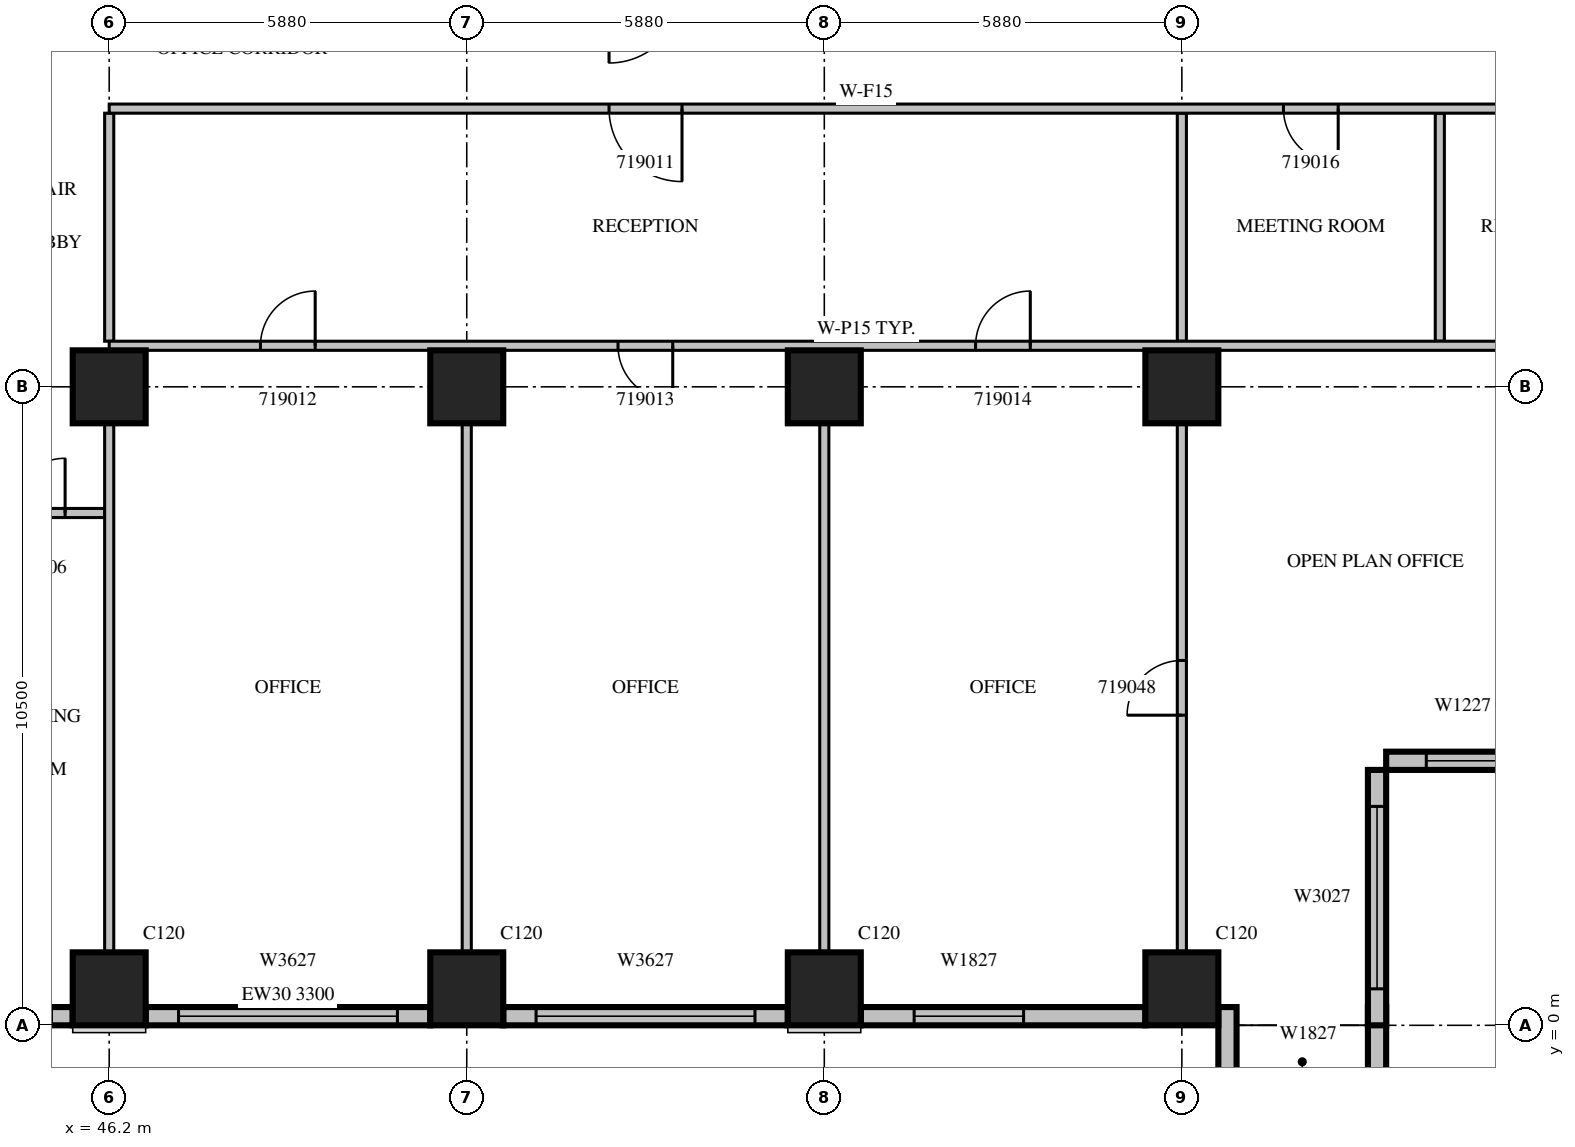
"""IFC4 building model, lengths in metres.
Left out: names, types, materials, properties, quantities, classifications, styles, units other than length and angle.
Written with IfcOpenShell. Run it as: python <this file> out.ifc"""

import sys

from ifc_helpers import new_model, si_unit, direction, frame, frame_2d, origin, origin_2d, place, context, subcontext, project, spatial, rectangle, extrude, source, transform, mapped, element, fill, save


model = new_model("IFC4")
c1 = context("Model", 3, precision=1e-05, world=origin(), true_north=direction((0.0, 1.0)))
c2 = subcontext(c1, "Body", "Model", "MODEL_VIEW")
j1 = project(units=[si_unit("LENGTHUNIT", "METRE"), si_unit("PLANEANGLEUNIT", "RADIAN")], contexts=[c1])
p1 = place(None, origin())
s1 = spatial("IfcSite", under=j1, at=p1, CompositionType="ELEMENT")
p2 = place(p1, origin())
s2 = spatial("IfcBuilding", under=s1, at=p2, CompositionType="ELEMENT")
p3 = place(p2, frame((0.0, 0.0, 90.9)))
s3 = spatial("IfcBuildingStorey", under=s2, at=p3, CompositionType="ELEMENT", Elevation=90.9)
m1 = source(origin(), c2, "Body", "SweptSolid", [
    extrude(rectangle(XDim=1.2, YDim=1.2, at=origin_2d()), origin(), (0.0, 0.0, 1.0), 4.2),
])
for number, where, z_axis, x_axis in (
    (1, (46.2, 0.6, 0.0), (0.0, 0.0, 1.0), (1.0, 0.0, 0.0)),
    (2, (52.08, 0.6, 0.0), (0.0, 0.0, 1.0), (1.0, 0.0, 0.0)),
    (3, (57.96, 0.6, 0.0), (0.0, 0.0, 1.0), (1.0, 0.0, 0.0)),
    (4, (63.84, 0.6, 0.0), (0.0, 0.0, 1.0), (1.0, 0.0, 0.0)),
    (5, (46.2, 10.5, 0.0), (0.0, 0.0, 1.0), (1.0, 0.0, 0.0)),
    (6, (52.08, 10.5, 0.0), (0.0, 0.0, 1.0), (1.0, 0.0, 0.0)),
    (7, (57.96, 10.5, 0.0), (0.0, 0.0, 1.0), (1.0, 0.0, 0.0)),
    (8, (63.84, 10.5, 0.0), (0.0, 0.0, 1.0), (1.0, 0.0, 0.0)),
):
    element("IfcColumn", number, at=place(p3, frame(where, z_axis=z_axis, x_axis=x_axis)), inside=s3, PredefinedType="COLUMN", context=c2, shape_type="MappedRepresentation", body=[
        mapped(m1, transform((0.0, 0.0, 0.0), scale=1.0)),
    ])
m2 = source(origin(), c2, "Body", "SweptSolid", [
    extrude(rectangle(XDim=1.6, YDim=0.3, at=frame_2d((0.8, 0.0))), origin(), (0.0, 0.0, 1.0), 3.8),
])
p4 = place(p3, frame((44.0, 0.15, 0.0), z_axis=(0.0, 0.0, 1.0), x_axis=(1.0, 0.0, 0.0)))
e9 = element("IfcWall", 9, at=p4, inside=s3, PredefinedType="STANDARD", context=c2, shape_type="MappedRepresentation", body=[
    mapped(m2, transform((0.0, 0.0, 0.0), scale=1.0)),
])
m3 = source(origin(), c2, "Body", "SweptSolid", [
    extrude(rectangle(XDim=0.9, YDim=2.7, at=frame_2d((0.45, 1.35))), frame((0.0, 0.16, 0.0), z_axis=(0.0, -1.0, 0.0), x_axis=(1.0, 0.0, 0.0)), (0.0, 0.0, 1.0), 0.32),
])
p5 = place(p4, frame((0.35, 0.0, 0.6)))
e10 = element("IfcOpeningElement", 10, at=p5, cuts=e9, PredefinedType="OPENING", context=c2, shape_type="MappedRepresentation", body=[
    mapped(m3, transform((0.0, 0.0, 0.0), scale=1.0)),
])
m4 = source(origin(), c2, "Body", "SweptSolid", [
    extrude(rectangle(XDim=4.68, YDim=0.3, at=frame_2d((2.34, 0.0))), origin(), (0.0, 0.0, 1.0), 3.3),
])
p6 = place(p3, frame((46.8, 0.15, 0.0), z_axis=(0.0, 0.0, 1.0), x_axis=(1.0, 0.0, 0.0)))
e11 = element("IfcWall", 11, at=p6, inside=s3, PredefinedType="STANDARD", context=c2, shape_type="MappedRepresentation", body=[
    mapped(m4, transform((0.0, 0.0, 0.0), scale=1.0)),
])
m5 = source(origin(), c2, "Body", "SweptSolid", [
    extrude(rectangle(XDim=3.6, YDim=2.7, at=frame_2d((1.8, 1.35))), frame((0.0, 0.16, 0.0), z_axis=(0.0, -1.0, 0.0), x_axis=(1.0, 0.0, 0.0)), (0.0, 0.0, 1.0), 0.32),
])
p7 = place(p6, frame((0.54, 0.0, 0.6)))
e12 = element("IfcOpeningElement", 12, at=p7, cuts=e11, PredefinedType="OPENING", context=c2, shape_type="MappedRepresentation", body=[
    mapped(m5, transform((0.0, 0.0, 0.0), scale=1.0)),
])
m6 = source(origin(), c2, "Body", "SweptSolid", [
    extrude(rectangle(XDim=4.68, YDim=0.3, at=frame_2d((2.34, 0.0))), origin(), (0.0, 0.0, 1.0), 3.8),
])
p8 = place(p3, frame((52.68, 0.15, 0.0), z_axis=(0.0, 0.0, 1.0), x_axis=(1.0, 0.0, 0.0)))
e13 = element("IfcWall", 13, at=p8, inside=s3, PredefinedType="STANDARD", context=c2, shape_type="MappedRepresentation", body=[
    mapped(m6, transform((0.0, 0.0, 0.0), scale=1.0)),
])
p9 = place(p8, frame((0.54, 0.0, 0.6)))
e14 = element("IfcOpeningElement", 14, at=p9, cuts=e13, PredefinedType="OPENING", context=c2, shape_type="MappedRepresentation", body=[
    mapped(m5, transform((0.0, 0.0, 0.0), scale=1.0)),
])
p10 = place(p3, frame((58.56, 0.15, 0.0), z_axis=(0.0, 0.0, 1.0), x_axis=(1.0, 0.0, 0.0)))
e15 = element("IfcWall", 15, at=p10, inside=s3, PredefinedType="STANDARD", context=c2, shape_type="MappedRepresentation", body=[
    mapped(m6, transform((0.0, 0.0, 0.0), scale=1.0)),
])
m7 = source(origin(), c2, "Body", "SweptSolid", [
    extrude(rectangle(XDim=1.8, YDim=2.7, at=frame_2d((0.9, 1.35))), frame((0.0, 0.16, 0.0), z_axis=(0.0, -1.0, 0.0), x_axis=(1.0, 0.0, 0.0)), (0.0, 0.0, 1.0), 0.32),
])
p11 = place(p10, frame((0.877, 0.0, 0.6)))
e16 = element("IfcOpeningElement", 16, at=p11, cuts=e15, PredefinedType="OPENING", context=c2, shape_type="MappedRepresentation", body=[
    mapped(m7, transform((0.0, 0.0, 0.0), scale=1.0)),
])
m8 = source(origin(), c2, "Body", "SweptSolid", [
    extrude(rectangle(XDim=1.2, YDim=0.3, at=frame_2d((0.6, 0.0))), origin(), (0.0, 0.0, 1.0), 3.8),
])
for number, where, z_axis, x_axis in (
    (17, (64.59, 0.3, 0.0), (0.0, 0.0, 1.0), (0.0, -1.0, 0.0)),
    (18, (67.05, 0.3, 0.0), (0.0, 0.0, 1.0), (0.0, -1.0, 0.0)),
):
    element("IfcWall", number, at=place(p3, frame(where, z_axis=z_axis, x_axis=x_axis)), inside=s3, PredefinedType="STANDARD", context=c2, shape_type="MappedRepresentation", body=[
        mapped(m8, transform((0.0, 0.0, 0.0), scale=1.0)),
    ])
m9 = source(origin(), c2, "Body", "SweptSolid", [
    extrude(rectangle(XDim=4.2, YDim=0.3, at=frame_2d((2.1, 0.0))), origin(), (0.0, 0.0, 1.0), 3.8),
])
p12 = place(p3, frame((67.05, 0.0, 0.0), z_axis=(0.0, 0.0, 1.0), x_axis=(0.0, 1.0, 0.0)))
e19 = element("IfcWall", 19, at=p12, inside=s3, PredefinedType="STANDARD", context=c2, shape_type="MappedRepresentation", body=[
    mapped(m9, transform((0.0, 0.0, 0.0), scale=1.0)),
])
m10 = source(origin(), c2, "Body", "SweptSolid", [
    extrude(rectangle(XDim=3.0, YDim=2.7, at=frame_2d((1.5, 1.35))), frame((0.0, 0.16, 0.0), z_axis=(0.0, -1.0, 0.0), x_axis=(1.0, 0.0, 0.0)), (0.0, 0.0, 1.0), 0.32),
])
p13 = place(p12, frame((0.6, 0.0, 0.6)))
e20 = element("IfcOpeningElement", 20, at=p13, cuts=e19, PredefinedType="OPENING", context=c2, shape_type="MappedRepresentation", body=[
    mapped(m10, transform((0.0, 0.0, 0.0), scale=1.0)),
])
m11 = source(origin(), c2, "Body", "SweptSolid", [
    extrude(rectangle(XDim=2.52, YDim=0.3, at=frame_2d((1.26, 0.0))), origin(), (0.0, 0.0, 1.0), 3.8),
])
p14 = place(p3, frame((67.2, 4.35, 0.0), z_axis=(0.0, 0.0, 1.0), x_axis=(1.0, 0.0, 0.0)))
e21 = element("IfcWall", 21, at=p14, inside=s3, PredefinedType="STANDARD", context=c2, shape_type="MappedRepresentation", body=[
    mapped(m11, transform((0.0, 0.0, 0.0), scale=1.0)),
])
m12 = source(origin(), c2, "Body", "SweptSolid", [
    extrude(rectangle(XDim=1.2, YDim=2.7, at=frame_2d((0.6, 1.35))), frame((0.0, 0.16, 0.0), z_axis=(0.0, -1.0, 0.0), x_axis=(1.0, 0.0, 0.0)), (0.0, 0.0, 1.0), 0.32),
])
p15 = place(p14, frame((0.66, 0.0, 0.6)))
e22 = element("IfcOpeningElement", 22, at=p15, cuts=e21, PredefinedType="OPENING", context=c2, shape_type="MappedRepresentation", body=[
    mapped(m12, transform((0.0, 0.0, 0.0), scale=1.0)),
])
m13 = source(origin(), c2, "Body", "SweptSolid", [
    extrude(rectangle(XDim=2.2, YDim=0.15, at=frame_2d((1.1, 0.0))), origin(), (0.0, 0.0, 1.0), 3.8),
])
p16 = place(p3, frame((46.125, 8.425, 0.0), z_axis=(0.0, 0.0, 1.0), x_axis=(-1.0, 0.0, 0.0)))
e23 = element("IfcWall", 23, at=p16, inside=s3, PredefinedType="PARTITIONING", context=c2, shape_type="MappedRepresentation", body=[
    mapped(m13, transform((0.0, 0.0, 0.0), scale=1.0)),
])
m14 = source(origin(), c2, "Body", "SweptSolid", [
    extrude(rectangle(XDim=0.9, YDim=2.1, at=frame_2d((0.45, 1.05))), frame((0.0, 0.085, 0.0), z_axis=(0.0, -1.0, 0.0), x_axis=(1.0, 0.0, 0.0)), (0.0, 0.0, 1.0), 0.17),
])
p17 = place(p16, frame((0.65, 0.0, 0.0)))
e24 = element("IfcOpeningElement", 24, at=p17, cuts=e23, PredefinedType="OPENING", context=c2, shape_type="MappedRepresentation", body=[
    mapped(m14, transform((0.0, 0.0, 0.0), scale=1.0)),
])
m15 = source(origin(), c2, "Body", "SweptSolid", [
    extrude(rectangle(XDim=8.702, YDim=0.15, at=frame_2d((4.351, 0.0))), origin(), (0.0, 0.0, 1.0), 3.8),
])
for number, where, z_axis, x_axis in (
    (25, (52.08, 1.199, 0.0), (0.0, 0.0, 1.0), (0.0, 1.0, 0.0)),
    (26, (57.96, 1.199, 0.0), (0.0, 0.0, 1.0), (0.0, 1.0, 0.0)),
):
    element("IfcWall", number, at=place(p3, frame(where, z_axis=z_axis, x_axis=x_axis)), inside=s3, PredefinedType="PARTITIONING", context=c2, shape_type="MappedRepresentation", body=[
        mapped(m15, transform((0.0, 0.0, 0.0), scale=1.0)),
    ])
m16 = source(origin(), c2, "Body", "SweptSolid", [
    extrude(rectangle(XDim=3.75, YDim=0.15, at=frame_2d((1.875, 0.0))), origin(), (0.0, 0.0, 1.0), 3.8),
])
p18 = place(p3, frame((68.082, 11.25, 0.0), z_axis=(0.0, 0.0, 1.0), x_axis=(0.0, 1.0, 0.0)))
e27 = element("IfcWall", 27, at=p18, inside=s3, PredefinedType="PARTITIONING", context=c2, shape_type="MappedRepresentation", body=[
    mapped(m16, transform((0.0, 0.0, 0.0), scale=1.0)),
])
p19 = place(p3, frame((46.2, 1.199, 0.0), z_axis=(0.0, 0.0, 1.0), x_axis=(0.0, 1.0, 0.0)))
e28 = element("IfcWall", 28, at=p19, inside=s3, PredefinedType="PARTITIONING", context=c2, shape_type="MappedRepresentation", body=[
    mapped(m15, transform((0.0, 0.0, 0.0), scale=1.0)),
])
p20 = place(p3, frame((46.2, 11.25, 0.0), z_axis=(0.0, 0.0, 1.0), x_axis=(0.0, 1.0, 0.0)))
e29 = element("IfcWall", 29, at=p20, inside=s3, PredefinedType="PARTITIONING", context=c2, shape_type="MappedRepresentation", body=[
    mapped(m16, transform((0.0, 0.0, 0.0), scale=1.0)),
])
p21 = place(p3, frame((63.84, 1.199, 0.0), z_axis=(0.0, 0.0, 1.0), x_axis=(0.0, 1.0, 0.0)))
e30 = element("IfcWall", 30, at=p21, inside=s3, PredefinedType="PARTITIONING", context=c2, shape_type="MappedRepresentation", body=[
    mapped(m15, transform((0.0, 0.0, 0.0), scale=1.0)),
])
p22 = place(p21, frame((3.901, 0.0, 0.0)))
e31 = element("IfcOpeningElement", 31, at=p22, cuts=e30, PredefinedType="OPENING", context=c2, shape_type="MappedRepresentation", body=[
    mapped(m14, transform((0.0, 0.0, 0.0), scale=1.0)),
])
p23 = place(p3, frame((63.84, 11.25, 0.0), z_axis=(0.0, 0.0, 1.0), x_axis=(0.0, 1.0, 0.0)))
e32 = element("IfcWall", 32, at=p23, inside=s3, PredefinedType="PARTITIONING", context=c2, shape_type="MappedRepresentation", body=[
    mapped(m16, transform((0.0, 0.0, 0.0), scale=1.0)),
])
m17 = source(origin(), c2, "Body", "SweptSolid", [
    extrude(rectangle(XDim=24.9, YDim=0.15, at=frame_2d((12.45, 0.0))), origin(), (0.0, 0.0, 1.0), 3.8),
])
p24 = place(p3, frame((71.1, 11.175, 0.0), z_axis=(0.0, 0.0, 1.0), x_axis=(-1.0, 0.0, 0.0)))
e33 = element("IfcWall", 33, at=p24, inside=s3, PredefinedType="PARTITIONING", context=c2, shape_type="MappedRepresentation", body=[
    mapped(m17, transform((0.0, 0.0, 0.0), scale=1.0)),
])
p25 = place(p24, frame((21.512, 0.0, 0.0)))
e34 = element("IfcOpeningElement", 34, at=p25, cuts=e33, PredefinedType="OPENING", context=c2, shape_type="MappedRepresentation", body=[
    mapped(m14, transform((0.0, 0.0, 0.0), scale=1.0)),
])
p26 = place(p24, frame((15.633, 0.0, 0.0)))
e35 = element("IfcOpeningElement", 35, at=p26, cuts=e33, PredefinedType="OPENING", context=c2, shape_type="MappedRepresentation", body=[
    mapped(m14, transform((0.0, 0.0, 0.0), scale=1.0)),
])
p27 = place(p24, frame((9.752, 0.0, 0.0)))
e36 = element("IfcOpeningElement", 36, at=p27, cuts=e33, PredefinedType="OPENING", context=c2, shape_type="MappedRepresentation", body=[
    mapped(m14, transform((0.0, 0.0, 0.0), scale=1.0)),
])
p28 = place(p3, frame((71.1, 15.075, 0.0), z_axis=(0.0, 0.0, 1.0), x_axis=(-1.0, 0.0, 0.0)))
e37 = element("IfcWall", 37, at=p28, inside=s3, PredefinedType="PARTITIONING", context=c2, shape_type="MappedRepresentation", body=[
    mapped(m17, transform((0.0, 0.0, 0.0), scale=1.0)),
])
m18 = source(origin(), c2, "Body", "SweptSolid", [
    extrude(rectangle(XDim=1.2, YDim=2.1, at=frame_2d((0.6, 1.05))), frame((0.0, 0.085, 0.0), z_axis=(0.0, -1.0, 0.0), x_axis=(1.0, 0.0, 0.0)), (0.0, 0.0, 1.0), 0.17),
])
p29 = place(p28, frame((15.48, 0.0, 0.0)))
e38 = element("IfcOpeningElement", 38, at=p29, cuts=e37, PredefinedType="OPENING", context=c2, shape_type="MappedRepresentation", body=[
    mapped(m18, transform((0.0, 0.0, 0.0), scale=1.0)),
])
m19 = source(origin(), c2, "Body", "SweptSolid", [
    extrude(rectangle(XDim=1.1, YDim=2.1, at=frame_2d((0.55, 1.05))), frame((0.0, 0.085, 0.0), z_axis=(0.0, -1.0, 0.0), x_axis=(1.0, 0.0, 0.0)), (0.0, 0.0, 1.0), 0.17),
])
p30 = place(p28, frame((0.921, 0.0, 0.0)))
e39 = element("IfcOpeningElement", 39, at=p30, cuts=e37, PredefinedType="OPENING", context=c2, shape_type="MappedRepresentation", body=[
    mapped(m19, transform((0.0, 0.0, 0.0), scale=1.0)),
])
p31 = place(p28, frame((4.689, 0.0, 0.0)))
e40 = element("IfcOpeningElement", 40, at=p31, cuts=e37, PredefinedType="OPENING", context=c2, shape_type="MappedRepresentation", body=[
    mapped(m14, transform((0.0, 0.0, 0.0), scale=1.0)),
])
m20 = source(origin(), c2, "Body", "SweptSolid", [
    extrude(rectangle(XDim=3.6, YDim=2.7, at=frame_2d((1.8, 1.35))), frame((0.0, 0.03, 0.0), z_axis=(0.0, -1.0, 0.0), x_axis=(1.0, 0.0, 0.0)), (0.0, 0.0, 1.0), 0.06),
])
p32 = place(p7, origin())
e41 = element("IfcWindow", 41, at=p32, inside=s3, PartitioningType="SINGLE_PANEL", PredefinedType="WINDOW", context=c2, shape_type="MappedRepresentation", body=[
    mapped(m20, transform((0.0, 0.0, 0.0), scale=1.0)),
])
fill(e12, e41)
p33 = place(p9, origin())
e42 = element("IfcWindow", 42, at=p33, inside=s3, PartitioningType="SINGLE_PANEL", PredefinedType="WINDOW", context=c2, shape_type="MappedRepresentation", body=[
    mapped(m20, transform((0.0, 0.0, 0.0), scale=1.0)),
])
fill(e14, e42)
m21 = source(origin(), c2, "Body", "SweptSolid", [
    extrude(rectangle(XDim=1.8, YDim=2.7, at=frame_2d((0.9, 1.35))), frame((0.0, 0.03, 0.0), z_axis=(0.0, -1.0, 0.0), x_axis=(1.0, 0.0, 0.0)), (0.0, 0.0, 1.0), 0.06),
])
p34 = place(p11, origin())
e43 = element("IfcWindow", 43, at=p34, inside=s3, PartitioningType="SINGLE_PANEL", PredefinedType="WINDOW", context=c2, shape_type="MappedRepresentation", body=[
    mapped(m21, transform((0.0, 0.0, 0.0), scale=1.0)),
])
fill(e16, e43)
m22 = source(origin(), c2, "Body", "SweptSolid", [
    extrude(rectangle(XDim=3.0, YDim=2.7, at=frame_2d((1.5, 1.35))), frame((0.0, 0.03, 0.0), z_axis=(0.0, -1.0, 0.0), x_axis=(1.0, 0.0, 0.0)), (0.0, 0.0, 1.0), 0.06),
])
p35 = place(p13, origin())
e44 = element("IfcWindow", 44, at=p35, inside=s3, PartitioningType="SINGLE_PANEL", PredefinedType="WINDOW", context=c2, shape_type="MappedRepresentation", body=[
    mapped(m22, transform((0.0, 0.0, 0.0), scale=1.0)),
])
fill(e20, e44)
m23 = source(origin(), c2, "Body", "SweptSolid", [
    extrude(rectangle(XDim=1.2, YDim=2.7, at=frame_2d((0.6, 1.35))), frame((0.0, 0.03, 0.0), z_axis=(0.0, -1.0, 0.0), x_axis=(1.0, 0.0, 0.0)), (0.0, 0.0, 1.0), 0.06),
])
p36 = place(p15, origin())
e45 = element("IfcWindow", 45, at=p36, inside=s3, PartitioningType="SINGLE_PANEL", PredefinedType="WINDOW", context=c2, shape_type="MappedRepresentation", body=[
    mapped(m23, transform((0.0, 0.0, 0.0), scale=1.0)),
])
fill(e22, e45)
m24 = source(origin(), c2, "Body", "SweptSolid", [
    extrude(rectangle(XDim=0.9, YDim=2.1, at=frame_2d((0.45, 1.05))), frame((0.0, 0.025, 0.0), z_axis=(0.0, -1.0, 0.0), x_axis=(1.0, 0.0, 0.0)), (0.0, 0.0, 1.0), 0.05),
])
p37 = place(p17, origin())
e46 = element("IfcDoor", 46, at=p37, inside=s3, OperationType="SINGLE_SWING_RIGHT", PredefinedType="DOOR", context=c2, shape_type="MappedRepresentation", body=[
    mapped(m24, transform((0.0, 0.0, 0.0), scale=1.0)),
])
fill(e24, e46)
m25 = source(origin(), c2, "Body", "SweptSolid", [
    extrude(rectangle(XDim=1.2, YDim=2.1, at=frame_2d((0.6, 1.05))), frame((0.0, 0.025, 0.0), z_axis=(0.0, -1.0, 0.0), x_axis=(1.0, 0.0, 0.0)), (0.0, 0.0, 1.0), 0.05),
])
p38 = place(p29, origin())
e47 = element("IfcDoor", 47, at=p38, inside=s3, OperationType="SINGLE_SWING_LEFT", PredefinedType="DOOR", context=c2, shape_type="MappedRepresentation", body=[
    mapped(m25, transform((0.0, 0.0, 0.0), scale=1.0)),
])
fill(e38, e47)
p39 = place(p25, origin())
e48 = element("IfcDoor", 48, at=p39, inside=s3, OperationType="SINGLE_SWING_RIGHT", PredefinedType="DOOR", context=c2, shape_type="MappedRepresentation", body=[
    mapped(m24, transform((0.0, 0.0, 0.0), scale=1.0)),
])
fill(e34, e48)
p40 = place(p26, origin())
e49 = element("IfcDoor", 49, at=p40, inside=s3, OperationType="SINGLE_SWING_LEFT", PredefinedType="DOOR", context=c2, shape_type="MappedRepresentation", body=[
    mapped(m24, transform((0.0, 0.0, 0.0), scale=1.0)),
])
fill(e35, e49)
p41 = place(p27, origin())
e50 = element("IfcDoor", 50, at=p41, inside=s3, OperationType="SINGLE_SWING_RIGHT", PredefinedType="DOOR", context=c2, shape_type="MappedRepresentation", body=[
    mapped(m24, transform((0.0, 0.0, 0.0), scale=1.0)),
])
fill(e36, e50)
p42 = place(p31, origin())
e51 = element("IfcDoor", 51, at=p42, inside=s3, OperationType="SINGLE_SWING_LEFT", PredefinedType="DOOR", context=c2, shape_type="MappedRepresentation", body=[
    mapped(m24, transform((0.0, 0.0, 0.0), scale=1.0)),
])
fill(e40, e51)
p43 = place(p22, origin())
e52 = element("IfcDoor", 52, at=p43, inside=s3, OperationType="SINGLE_SWING_LEFT", PredefinedType="DOOR", context=c2, shape_type="MappedRepresentation", body=[
    mapped(m24, transform((0.0, 0.0, 0.0), scale=1.0)),
])
fill(e31, e52)
save(model, sys.argv[1])
